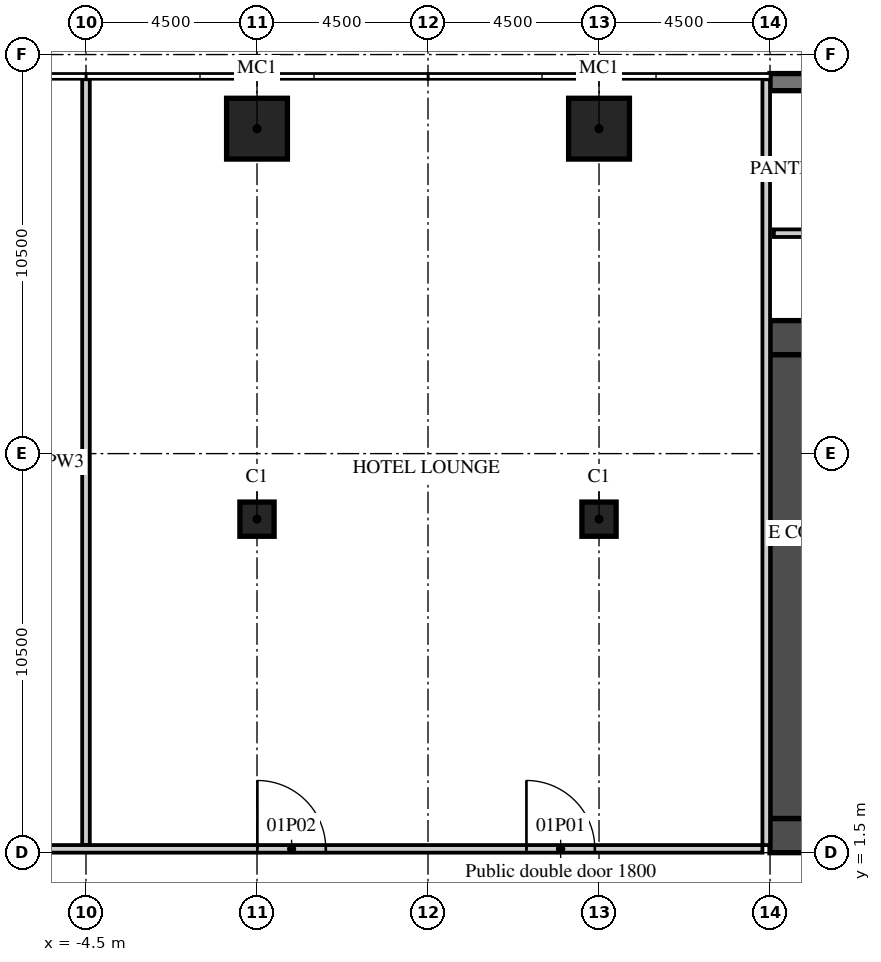
"""IFC4 building model, lengths in metres.
Left out: names, types, materials, properties, quantities, classifications, styles, units other than length and angle.
Written with IfcOpenShell. Run it as: python <this file> out.ifc"""

import sys

from ifc_helpers import new_model, si_unit, direction, frame, frame_2d, origin, origin_2d, place, context, subcontext, project, spatial, rectangle, extrude, element, fill, save


model = new_model("IFC4")
c1 = context("Model", 3, precision=1e-05, world=origin(), true_north=direction((0.0, 1.0)))
c2 = subcontext(c1, "Body", "Model", "MODEL_VIEW")
j1 = project(units=[si_unit("LENGTHUNIT", "METRE"), si_unit("PLANEANGLEUNIT", "RADIAN")], contexts=[c1])
p1 = place(None, origin())
s1 = spatial("IfcSite", under=j1, at=p1, CompositionType="ELEMENT")
p2 = place(p1, origin())
s2 = spatial("IfcBuilding", under=s1, at=p2, CompositionType="ELEMENT")
p3 = place(p2, frame((0.0, 0.0, 11.0)))
s3 = spatial("IfcBuildingStorey", under=s2, at=p3, CompositionType="ELEMENT", Elevation=11.0)
for number, where, z_axis, x_axis in (
    (1, (0.0, 20.55, 0.0), (0.0, 0.0, 1.0), (1.0, 0.0, 0.0)),
    (2, (9.0, 20.55, 0.0), (0.0, 0.0, 1.0), (1.0, 0.0, 0.0)),
):
    element("IfcColumn", number, at=place(p3, frame(where, z_axis=z_axis, x_axis=x_axis)), inside=s3, PredefinedType="COLUMN", context=c2, shape_type="SweptSolid", body=[
        extrude(rectangle(XDim=1.6, YDim=1.6, at=origin_2d()), origin(), (0.0, 0.0, 1.0), 6.0),
    ])
for number, where, z_axis, x_axis in (
    (3, (0.0, 10.275, 0.0), (0.0, 0.0, 1.0), (1.0, 0.0, 0.0)),
    (4, (9.0, 10.275, 0.0), (0.0, 0.0, 1.0), (1.0, 0.0, 0.0)),
):
    element("IfcColumn", number, at=place(p3, frame(where, z_axis=z_axis, x_axis=x_axis)), inside=s3, PredefinedType="COLUMN", context=c2, shape_type="SweptSolid", body=[
        extrude(rectangle(XDim=0.9, YDim=0.9, at=origin_2d()), origin(), (0.0, 0.0, 1.0), 6.0),
    ])
p4 = place(p3, frame((31.5, 21.775, 0.0), z_axis=(0.0, 0.0, 1.0), x_axis=(-1.0, 0.0, 0.0)))
e5 = element("IfcWall", 5, at=p4, inside=s3, PredefinedType="SOLIDWALL", context=c2, shape_type="SweptSolid", body=[
    extrude(rectangle(XDim=18.0, YDim=0.45, at=frame_2d((9.0, 0.0))), origin(), (0.0, 0.0, 1.0), 5.55),
])
p5 = place(p3, frame((13.5, 1.95, 0.0), z_axis=(0.0, 0.0, 1.0), x_axis=(1.0, 0.0, 0.0)))
e6 = element("IfcWall", 6, at=p5, inside=s3, PredefinedType="SHEAR", context=c2, shape_type="SweptSolid", body=[
    extrude(rectangle(XDim=18.0, YDim=0.9, at=frame_2d((9.0, 0.0))), origin(), (0.0, 0.0, 1.0), 5.55),
])
p6 = place(p5, frame((1.475, 0.0, 0.0)))
e7 = element("IfcOpeningElement", 7, at=p6, cuts=e6, PredefinedType="OPENING", context=c2, shape_type="SweptSolid", body=[
    extrude(rectangle(XDim=1.8, YDim=2.1, at=frame_2d((0.9, 1.05))), frame((0.0, 0.46, 0.0), z_axis=(0.0, -1.0, 0.0), x_axis=(1.0, 0.0, 0.0)), (0.0, 0.0, 1.0), 0.92),
])
p7 = place(p3, frame((13.5, 15.05, 0.0), z_axis=(0.0, 0.0, 1.0), x_axis=(1.0, 0.0, 0.0)))
e8 = element("IfcWall", 8, at=p7, inside=s3, PredefinedType="SHEAR", context=c2, shape_type="SweptSolid", body=[
    extrude(rectangle(XDim=6.8, YDim=0.9, at=frame_2d((3.4, 0.0))), origin(), (0.0, 0.0, 1.0), 5.55),
])
p8 = place(p7, frame((4.725, 0.0, 0.0)))
e9 = element("IfcOpeningElement", 9, at=p8, cuts=e8, PredefinedType="OPENING", context=c2, shape_type="SweptSolid", body=[
    extrude(rectangle(XDim=1.2, YDim=2.1, at=frame_2d((0.6, 1.05))), frame((0.0, 0.46, 0.0), z_axis=(0.0, -1.0, 0.0), x_axis=(1.0, 0.0, 0.0)), (0.0, 0.0, 1.0), 0.92),
])
p9 = place(p3, frame((13.95, 2.4, 0.0), z_axis=(0.0, 0.0, 1.0), x_axis=(0.0, 1.0, 0.0)))
e10 = element("IfcWall", 10, at=p9, inside=s3, PredefinedType="SHEAR", context=c2, shape_type="SweptSolid", body=[
    extrude(rectangle(XDim=12.2, YDim=0.9, at=frame_2d((6.1, 0.0))), origin(), (0.0, 0.0, 1.0), 5.55),
])
p10 = place(p3, frame((13.6, 17.8, 0.0), z_axis=(0.0, 0.0, 1.0), x_axis=(1.0, 0.0, 0.0)))
e11 = element("IfcWall", 11, at=p10, inside=s3, PredefinedType="PARTITIONING", context=c2, shape_type="SweptSolid", body=[
    extrude(rectangle(XDim=30.95, YDim=0.2, at=frame_2d((15.475, 0.0))), origin(), (0.0, 0.0, 1.0), 5.55),
])
p11 = place(p10, frame((15.012, 0.0, 0.0)))
e12 = element("IfcOpeningElement", 12, at=p11, cuts=e11, PredefinedType="OPENING", context=c2, shape_type="SweptSolid", body=[
    extrude(rectangle(XDim=0.9, YDim=2.1, at=frame_2d((0.45, 1.05))), frame((0.0, 0.11, 0.0), z_axis=(0.0, -1.0, 0.0), x_axis=(1.0, 0.0, 0.0)), (0.0, 0.0, 1.0), 0.22),
])
p12 = place(p10, frame((6.712, 0.0, 0.0)))
e13 = element("IfcOpeningElement", 13, at=p12, cuts=e11, PredefinedType="OPENING", context=c2, shape_type="SweptSolid", body=[
    extrude(rectangle(XDim=0.9, YDim=2.1, at=frame_2d((0.45, 1.05))), frame((0.0, 0.11, 0.0), z_axis=(0.0, -1.0, 0.0), x_axis=(1.0, 0.0, 0.0)), (0.0, 0.0, 1.0), 0.22),
])
p13 = place(p3, frame((-4.5, 1.7, 0.0), z_axis=(0.0, 0.0, 1.0), x_axis=(0.0, 1.0, 0.0)))
e14 = element("IfcWall", 14, at=p13, inside=s3, PredefinedType="PARTITIONING", context=c2, shape_type="SweptSolid", body=[
    extrude(rectangle(XDim=20.15, YDim=0.2, at=frame_2d((10.075, 0.0))), origin(), (0.0, 0.0, 1.0), 5.55),
])
p14 = place(p3, frame((-39.4, 1.6, 0.0), z_axis=(0.0, 0.0, 1.0), x_axis=(1.0, 0.0, 0.0)))
e15 = element("IfcWall", 15, at=p14, inside=s3, PredefinedType="PARTITIONING", context=c2, shape_type="SweptSolid", body=[
    extrude(rectangle(XDim=52.7, YDim=0.2, at=frame_2d((26.35, 0.0))), origin(), (0.0, 0.0, 1.0), 5.55),
])
p15 = place(p14, frame((46.49, 0.0, 0.0)))
e16 = element("IfcOpeningElement", 16, at=p15, cuts=e15, PredefinedType="OPENING", context=c2, shape_type="SweptSolid", body=[
    extrude(rectangle(XDim=1.8, YDim=2.1, at=frame_2d((0.9, 1.05))), frame((0.0, 0.11, 0.0), z_axis=(0.0, -1.0, 0.0), x_axis=(1.0, 0.0, 0.0)), (0.0, 0.0, 1.0), 0.22),
])
p16 = place(p14, frame((39.41, 0.0, 0.0)))
e17 = element("IfcOpeningElement", 17, at=p16, cuts=e15, PredefinedType="OPENING", context=c2, shape_type="SweptSolid", body=[
    extrude(rectangle(XDim=1.8, YDim=2.1, at=frame_2d((0.9, 1.05))), frame((0.0, 0.11, 0.0), z_axis=(0.0, -1.0, 0.0), x_axis=(1.0, 0.0, 0.0)), (0.0, 0.0, 1.0), 0.22),
])
p17 = place(p14, frame((29.9, 0.0, 0.0)))
e18 = element("IfcOpeningElement", 18, at=p17, cuts=e15, PredefinedType="OPENING", context=c2, shape_type="SweptSolid", body=[
    extrude(rectangle(XDim=1.0, YDim=2.1, at=frame_2d((0.5, 1.05))), frame((0.0, 0.11, 0.0), z_axis=(0.0, -1.0, 0.0), x_axis=(1.0, 0.0, 0.0)), (0.0, 0.0, 1.0), 0.22),
])
p18 = place(p14, frame((23.375, 0.0, 0.0)))
e19 = element("IfcOpeningElement", 19, at=p18, cuts=e15, PredefinedType="OPENING", context=c2, shape_type="SweptSolid", body=[
    extrude(rectangle(XDim=1.2, YDim=2.1, at=frame_2d((0.6, 1.05))), frame((0.0, 0.11, 0.0), z_axis=(0.0, -1.0, 0.0), x_axis=(1.0, 0.0, 0.0)), (0.0, 0.0, 1.0), 0.22),
])
p19 = place(p14, frame((11.5, 0.0, 0.0)))
e20 = element("IfcOpeningElement", 20, at=p19, cuts=e15, PredefinedType="OPENING", context=c2, shape_type="SweptSolid", body=[
    extrude(rectangle(XDim=1.8, YDim=2.1, at=frame_2d((0.9, 1.05))), frame((0.0, 0.11, 0.0), z_axis=(0.0, -1.0, 0.0), x_axis=(1.0, 0.0, 0.0)), (0.0, 0.0, 1.0), 0.22),
])
p20 = place(p14, frame((3.1, 0.0, 0.0)))
e21 = element("IfcOpeningElement", 21, at=p20, cuts=e15, PredefinedType="OPENING", context=c2, shape_type="SweptSolid", body=[
    extrude(rectangle(XDim=1.8, YDim=2.1, at=frame_2d((0.9, 1.05))), frame((0.0, 0.11, 0.0), z_axis=(0.0, -1.0, 0.0), x_axis=(1.0, 0.0, 0.0)), (0.0, 0.0, 1.0), 0.22),
])
p21 = place(p3, frame((13.4, 1.7, 0.0), z_axis=(0.0, 0.0, 1.0), x_axis=(0.0, 1.0, 0.0)))
e22 = element("IfcWall", 22, at=p21, inside=s3, PredefinedType="PARTITIONING", context=c2, shape_type="SweptSolid", body=[
    extrude(rectangle(XDim=20.15, YDim=0.2, at=frame_2d((10.075, 0.0))), origin(), (0.0, 0.0, 1.0), 5.55),
])
p22 = place(p15, origin())
e23 = element("IfcDoor", 23, at=p22, inside=s3, OperationType="DOUBLE_DOOR_DOUBLE_SWING", PredefinedType="DOOR", context=c2, shape_type="SweptSolid", body=[
    extrude(rectangle(XDim=1.8, YDim=2.1, at=frame_2d((0.9, 1.05))), frame((0.0, 0.025, 0.0), z_axis=(0.0, -1.0, 0.0), x_axis=(1.0, 0.0, 0.0)), (0.0, 0.0, 1.0), 0.05),
])
fill(e16, e23)
p23 = place(p16, origin())
e24 = element("IfcDoor", 24, at=p23, inside=s3, OperationType="DOUBLE_DOOR_DOUBLE_SWING", PredefinedType="DOOR", context=c2, shape_type="SweptSolid", body=[
    extrude(rectangle(XDim=1.8, YDim=2.1, at=frame_2d((0.9, 1.05))), frame((0.0, 0.025, 0.0), z_axis=(0.0, -1.0, 0.0), x_axis=(1.0, 0.0, 0.0)), (0.0, 0.0, 1.0), 0.05),
])
fill(e17, e24)
save(model, sys.argv[1])
